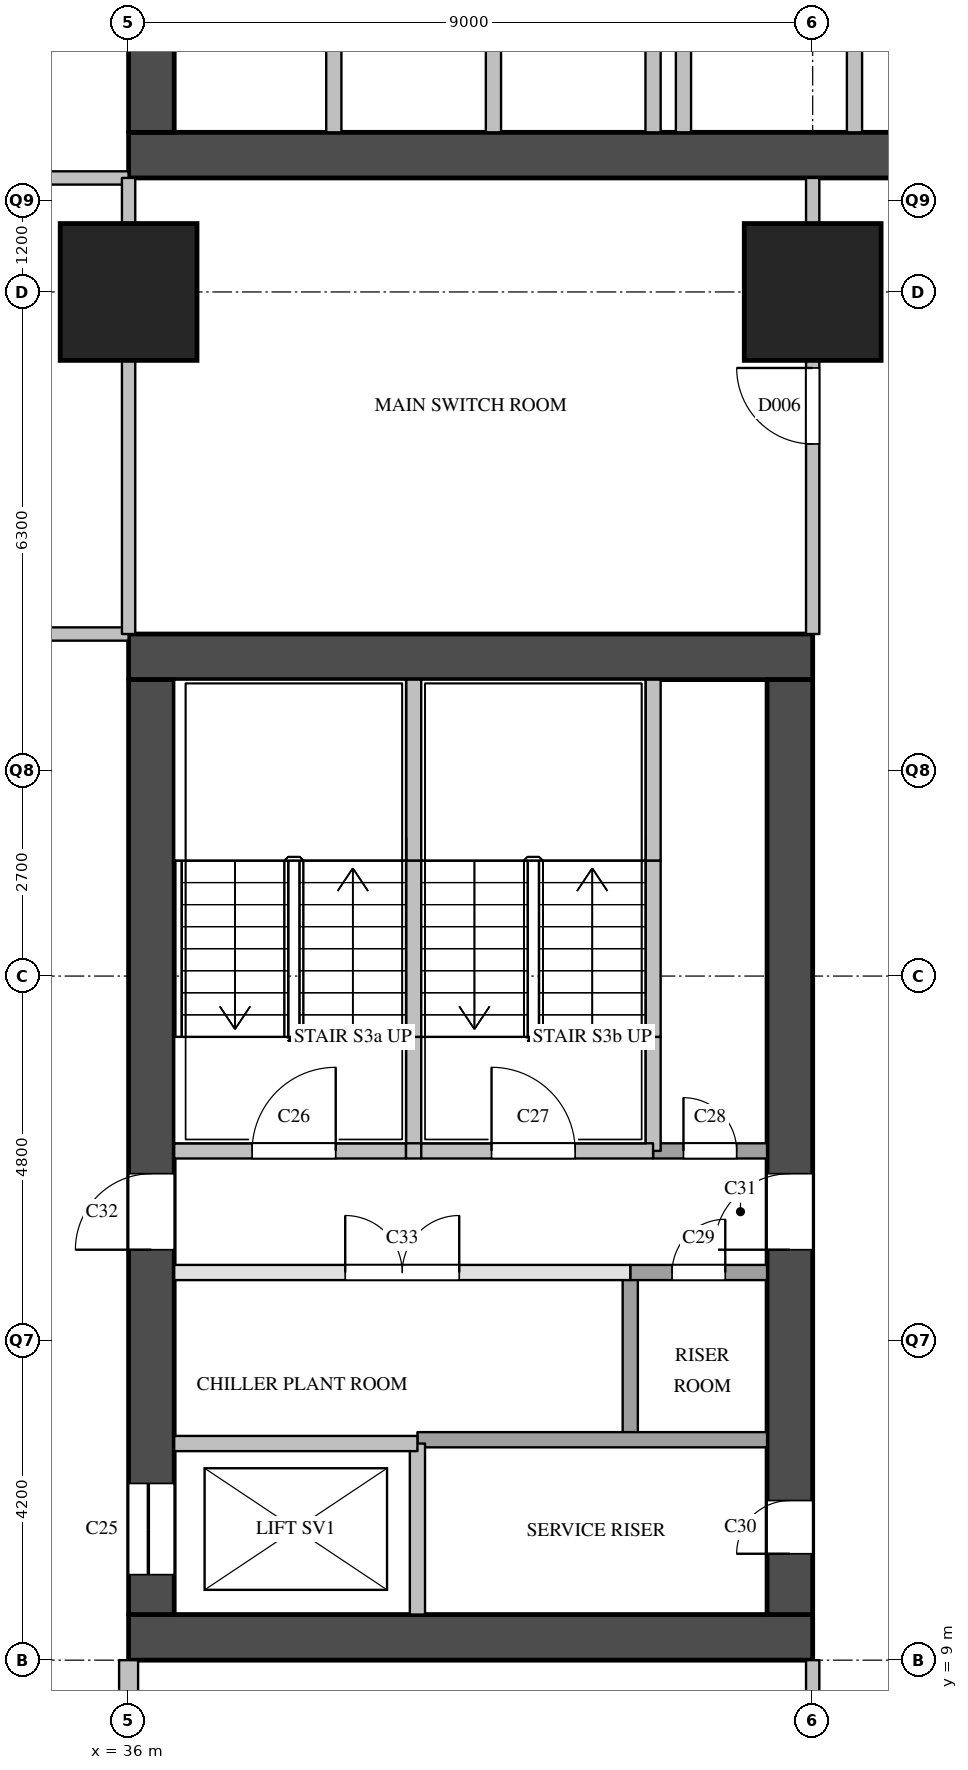
"""IFC4 building model, lengths in metres.
Left out: names, types, materials, properties, quantities, classifications, styles, units other than length and angle.
Written with IfcOpenShell. Run it as: python <this file> out.ifc"""

import sys

from ifc_helpers import new_model, si_unit, direction, frame, frame_2d, origin, origin_2d, place, context, subcontext, project, spatial, rectangle, extrude, element, fill, save


model = new_model("IFC4")
c1 = context("Model", 3, precision=1e-05, world=origin(), true_north=direction((0.0, 1.0)))
c2 = subcontext(c1, "Body", "Model", "MODEL_VIEW")
j1 = project(units=[si_unit("LENGTHUNIT", "METRE"), si_unit("PLANEANGLEUNIT", "RADIAN")], contexts=[c1])
p1 = place(None, origin())
s1 = spatial("IfcSite", under=j1, at=p1, CompositionType="ELEMENT")
p2 = place(p1, origin())
s2 = spatial("IfcBuilding", under=s1, at=p2, CompositionType="ELEMENT")
p3 = place(p2, frame((0.0, 0.0, -6.0)))
s3 = spatial("IfcBuildingStorey", under=s2, at=p3, CompositionType="ELEMENT", Elevation=-6.0)
for number, where, z_axis, x_axis in (
    (1, (36.0, 27.0, 0.0), (0.0, 0.0, 1.0), (1.0, 0.0, 0.0)),
    (2, (45.0, 27.0, 0.0), (0.0, 0.0, 1.0), (1.0, 0.0, 0.0)),
):
    element("IfcColumn", number, at=place(p3, frame(where, z_axis=z_axis, x_axis=x_axis)), inside=s3, PredefinedType="COLUMN", context=c2, shape_type="SweptSolid", body=[
        extrude(rectangle(XDim=1.8, YDim=1.8, at=origin_2d()), origin(), (0.0, 0.0, 1.0), 6.0),
    ])
p4 = place(p3, frame((36.0, 28.8, 0.0), z_axis=(0.0, 0.0, 1.0), x_axis=(1.0, 0.0, 0.0)))
e3 = element("IfcWall", 3, at=p4, inside=s3, PredefinedType="SHEAR", context=c2, shape_type="SweptSolid", body=[
    extrude(rectangle(XDim=12.4, YDim=0.6, at=frame_2d((6.2, 0.0))), origin(), (0.0, 0.0, 1.0), 5.59),
])
p5 = place(p3, frame((36.3, 29.1, 0.0), z_axis=(0.0, 0.0, 1.0), x_axis=(0.0, 1.0, 0.0)))
e4 = element("IfcWall", 4, at=p5, inside=s3, PredefinedType="SHEAR", context=c2, shape_type="SweptSolid", body=[
    extrude(rectangle(XDim=20.3, YDim=0.6, at=frame_2d((10.15, 0.0))), origin(), (0.0, 0.0, 1.0), 5.59),
])
p6 = place(p5, frame((16.4, 0.0, 0.0)))
e5 = element("IfcOpeningElement", 5, at=p6, cuts=e4, PredefinedType="OPENING", context=c2, shape_type="SweptSolid", body=[
    extrude(rectangle(XDim=1.0, YDim=2.1, at=frame_2d((0.5, 1.05))), frame((0.0, 0.31, 0.0), z_axis=(0.0, -1.0, 0.0), x_axis=(1.0, 0.0, 0.0)), (0.0, 0.0, 1.0), 0.62),
])
for number, where, z_axis, x_axis in (
    (6, (38.7, 29.1, 0.0), (0.0, 0.0, 1.0), (0.0, 1.0, 0.0)),
    (7, (40.8, 29.1, 0.0), (0.0, 0.0, 1.0), (0.0, 1.0, 0.0)),
    (8, (42.9, 29.1, 0.0), (0.0, 0.0, 1.0), (0.0, 1.0, 0.0)),
    (9, (43.3, 29.1, 0.0), (0.0, 0.0, 1.0), (0.0, 1.0, 0.0)),
    (10, (45.55, 29.1, 0.0), (0.0, 0.0, 1.0), (0.0, 1.0, 0.0)),
):
    element("IfcWall", number, at=place(p3, frame(where, z_axis=z_axis, x_axis=x_axis)), inside=s3, PredefinedType="SOLIDWALL", context=c2, shape_type="SweptSolid", body=[
        extrude(rectangle(XDim=3.2, YDim=0.2, at=frame_2d((1.6, 0.0))), origin(), (0.0, 0.0, 1.0), 5.59),
    ])
for number, where, z_axis, x_axis in (
    (11, (36.0, 9.3, 0.0), (0.0, 0.0, 1.0), (1.0, 0.0, 0.0)),
    (12, (36.0, 22.2, 0.0), (0.0, 0.0, 1.0), (1.0, 0.0, 0.0)),
):
    element("IfcWall", number, at=place(p3, frame(where, z_axis=z_axis, x_axis=x_axis)), inside=s3, PredefinedType="SHEAR", context=c2, shape_type="SweptSolid", body=[
        extrude(rectangle(XDim=9.0, YDim=0.6, at=frame_2d((4.5, 0.0))), origin(), (0.0, 0.0, 1.0), 5.59),
    ])
p7 = place(p3, frame((36.3, 9.6, 0.0), z_axis=(0.0, 0.0, 1.0), x_axis=(0.0, 1.0, 0.0)))
e13 = element("IfcWall", 13, at=p7, inside=s3, PredefinedType="SHEAR", context=c2, shape_type="SweptSolid", body=[
    extrude(rectangle(XDim=12.3, YDim=0.6, at=frame_2d((6.15, 0.0))), origin(), (0.0, 0.0, 1.0), 5.59),
])
p8 = place(p7, frame((0.525, 0.0, 0.0)))
e14 = element("IfcOpeningElement", 14, at=p8, cuts=e13, PredefinedType="OPENING", context=c2, shape_type="SweptSolid", body=[
    extrude(rectangle(XDim=1.2, YDim=2.1, at=frame_2d((0.6, 1.05))), frame((0.0, 0.31, 0.0), z_axis=(0.0, -1.0, 0.0), x_axis=(1.0, 0.0, 0.0)), (0.0, 0.0, 1.0), 0.62),
])
p9 = place(p7, frame((4.8, 0.0, 0.0)))
e15 = element("IfcOpeningElement", 15, at=p9, cuts=e13, PredefinedType="OPENING", context=c2, shape_type="SweptSolid", body=[
    extrude(rectangle(XDim=1.0, YDim=2.1, at=frame_2d((0.5, 1.05))), frame((0.0, 0.31, 0.0), z_axis=(0.0, -1.0, 0.0), x_axis=(1.0, 0.0, 0.0)), (0.0, 0.0, 1.0), 0.62),
])
p10 = place(p3, frame((44.7, 9.6, 0.0), z_axis=(0.0, 0.0, 1.0), x_axis=(0.0, 1.0, 0.0)))
e16 = element("IfcWall", 16, at=p10, inside=s3, PredefinedType="SHEAR", context=c2, shape_type="SweptSolid", body=[
    extrude(rectangle(XDim=12.3, YDim=0.6, at=frame_2d((6.15, 0.0))), origin(), (0.0, 0.0, 1.0), 5.59),
])
p11 = place(p10, frame((0.8, 0.0, 0.0)))
e17 = element("IfcOpeningElement", 17, at=p11, cuts=e16, PredefinedType="OPENING", context=c2, shape_type="SweptSolid", body=[
    extrude(rectangle(XDim=0.7, YDim=2.1, at=frame_2d((0.35, 1.05))), frame((0.0, 0.31, 0.0), z_axis=(0.0, -1.0, 0.0), x_axis=(1.0, 0.0, 0.0)), (0.0, 0.0, 1.0), 0.62),
])
p12 = place(p10, frame((4.8, 0.0, 0.0)))
e18 = element("IfcOpeningElement", 18, at=p12, cuts=e16, PredefinedType="OPENING", context=c2, shape_type="SweptSolid", body=[
    extrude(rectangle(XDim=1.0, YDim=2.1, at=frame_2d((0.5, 1.05))), frame((0.0, 0.31, 0.0), z_axis=(0.0, -1.0, 0.0), x_axis=(1.0, 0.0, 0.0)), (0.0, 0.0, 1.0), 0.62),
])
p13 = place(p3, frame((39.75, 15.7, 0.0), z_axis=(0.0, 0.0, 1.0), x_axis=(0.0, 1.0, 0.0)))
e19 = element("IfcWall", 19, at=p13, inside=s3, PredefinedType="SOLIDWALL", context=c2, shape_type="SweptSolid", body=[
    extrude(rectangle(XDim=1.5, YDim=0.2, at=frame_2d((0.75, 0.0))), origin(), (0.0, 0.0, 1.0), 5.59),
])
p14 = place(p3, frame((39.75, 17.2, 0.0), z_axis=(0.0, 0.0, 1.0), x_axis=(0.0, 1.0, 0.0)))
e20 = element("IfcWall", 20, at=p14, inside=s3, PredefinedType="SOLIDWALL", context=c2, shape_type="SweptSolid", body=[
    extrude(rectangle(XDim=2.32, YDim=0.2, at=frame_2d((1.16, 0.0))), origin(), (0.0, 0.0, 1.0), 5.59),
])
p15 = place(p3, frame((39.75, 19.52, 0.0), z_axis=(0.0, 0.0, 1.0), x_axis=(0.0, 1.0, 0.0)))
e21 = element("IfcWall", 21, at=p15, inside=s3, PredefinedType="SOLIDWALL", context=c2, shape_type="SweptSolid", body=[
    extrude(rectangle(XDim=2.38, YDim=0.2, at=frame_2d((1.19, 0.0))), origin(), (0.0, 0.0, 1.0), 5.59),
])
p16 = place(p3, frame((39.8, 9.6, 0.0), z_axis=(0.0, 0.0, 1.0), x_axis=(0.0, 1.0, 0.0)))
e22 = element("IfcWall", 22, at=p16, inside=s3, PredefinedType="SOLIDWALL", context=c2, shape_type="SweptSolid", body=[
    extrude(rectangle(XDim=2.25, YDim=0.2, at=frame_2d((1.125, 0.0))), origin(), (0.0, 0.0, 1.0), 5.59),
])
p17 = place(p3, frame((39.8, 11.85, 0.0), z_axis=(0.0, 0.0, 1.0), x_axis=(0.0, 1.0, 0.0)))
e23 = element("IfcWall", 23, at=p17, inside=s3, PredefinedType="SOLIDWALL", context=c2, shape_type="SweptSolid", body=[
    extrude(rectangle(XDim=0.05, YDim=0.2, at=frame_2d((0.025, 0.0))), origin(), (0.0, 0.0, 1.0), 5.59),
])
p18 = place(p3, frame((42.6, 11.9, 0.0), z_axis=(0.0, 0.0, 1.0), x_axis=(0.0, 1.0, 0.0)))
e24 = element("IfcWall", 24, at=p18, inside=s3, PredefinedType="SOLIDWALL", context=c2, shape_type="SweptSolid", body=[
    extrude(rectangle(XDim=2.2, YDim=0.2, at=frame_2d((1.1, 0.0))), origin(), (0.0, 0.0, 1.0), 5.59),
])
p19 = place(p3, frame((42.9, 15.7, 0.0), z_axis=(0.0, 0.0, 1.0), x_axis=(0.0, 1.0, 0.0)))
e25 = element("IfcWall", 25, at=p19, inside=s3, PredefinedType="SOLIDWALL", context=c2, shape_type="SweptSolid", body=[
    extrude(rectangle(XDim=1.5, YDim=0.2, at=frame_2d((0.75, 0.0))), origin(), (0.0, 0.0, 1.0), 5.59),
])
p20 = place(p3, frame((42.9, 17.2, 0.0), z_axis=(0.0, 0.0, 1.0), x_axis=(0.0, 1.0, 0.0)))
e26 = element("IfcWall", 26, at=p20, inside=s3, PredefinedType="SOLIDWALL", context=c2, shape_type="SweptSolid", body=[
    extrude(rectangle(XDim=2.32, YDim=0.2, at=frame_2d((1.16, 0.0))), origin(), (0.0, 0.0, 1.0), 5.59),
])
p21 = place(p3, frame((42.9, 19.52, 0.0), z_axis=(0.0, 0.0, 1.0), x_axis=(0.0, 1.0, 0.0)))
e27 = element("IfcWall", 27, at=p21, inside=s3, PredefinedType="SOLIDWALL", context=c2, shape_type="SweptSolid", body=[
    extrude(rectangle(XDim=2.38, YDim=0.2, at=frame_2d((1.19, 0.0))), origin(), (0.0, 0.0, 1.0), 5.59),
])
p22 = place(p3, frame((36.6, 11.85, 0.0), z_axis=(0.0, 0.0, 1.0), x_axis=(1.0, 0.0, 0.0)))
e28 = element("IfcWall", 28, at=p22, inside=s3, PredefinedType="SOLIDWALL", context=c2, shape_type="SweptSolid", body=[
    extrude(rectangle(XDim=3.2, YDim=0.2, at=frame_2d((1.6, 0.0))), origin(), (0.0, 0.0, 1.0), 5.59),
])
p23 = place(p3, frame((39.8, 11.9, 0.0), z_axis=(0.0, 0.0, 1.0), x_axis=(1.0, 0.0, 0.0)))
e29 = element("IfcWall", 29, at=p23, inside=s3, PredefinedType="SOLIDWALL", context=c2, shape_type="SweptSolid", body=[
    extrude(rectangle(XDim=4.6, YDim=0.2, at=frame_2d((2.3, 0.0))), origin(), (0.0, 0.0, 1.0), 5.59),
])
p24 = place(p3, frame((36.6, 14.1, 0.0), z_axis=(0.0, 0.0, 1.0), x_axis=(1.0, 0.0, 0.0)))
e30 = element("IfcWall", 30, at=p24, inside=s3, PredefinedType="PARTITIONING", context=c2, shape_type="SweptSolid", body=[
    extrude(rectangle(XDim=6.0, YDim=0.2, at=frame_2d((3.0, 0.0))), origin(), (0.0, 0.0, 1.0), 5.59),
])
p25 = place(p24, frame((2.25, 0.0, 0.0)))
e31 = element("IfcOpeningElement", 31, at=p25, cuts=e30, PredefinedType="OPENING", context=c2, shape_type="SweptSolid", body=[
    extrude(rectangle(XDim=1.5, YDim=2.1, at=frame_2d((0.75, 1.05))), frame((0.0, 0.11, 0.0), z_axis=(0.0, -1.0, 0.0), x_axis=(1.0, 0.0, 0.0)), (0.0, 0.0, 1.0), 0.22),
])
p26 = place(p3, frame((42.6, 14.1, 0.0), z_axis=(0.0, 0.0, 1.0), x_axis=(1.0, 0.0, 0.0)))
e32 = element("IfcWall", 32, at=p26, inside=s3, PredefinedType="SOLIDWALL", context=c2, shape_type="SweptSolid", body=[
    extrude(rectangle(XDim=1.8, YDim=0.2, at=frame_2d((0.9, 0.0))), origin(), (0.0, 0.0, 1.0), 5.59),
])
p27 = place(p26, frame((0.55, 0.0, 0.0)))
e33 = element("IfcOpeningElement", 33, at=p27, cuts=e32, PredefinedType="OPENING", context=c2, shape_type="SweptSolid", body=[
    extrude(rectangle(XDim=0.7, YDim=2.1, at=frame_2d((0.35, 1.05))), frame((0.0, 0.11, 0.0), z_axis=(0.0, -1.0, 0.0), x_axis=(1.0, 0.0, 0.0)), (0.0, 0.0, 1.0), 0.22),
])
p28 = place(p3, frame((42.9, 15.7, 0.0), z_axis=(0.0, 0.0, 1.0), x_axis=(1.0, 0.0, 0.0)))
e34 = element("IfcWall", 34, at=p28, inside=s3, PredefinedType="SOLIDWALL", context=c2, shape_type="SweptSolid", body=[
    extrude(rectangle(XDim=1.5, YDim=0.2, at=frame_2d((0.75, 0.0))), origin(), (0.0, 0.0, 1.0), 5.59),
])
p29 = place(p28, frame((0.4, 0.0, 0.0)))
e35 = element("IfcOpeningElement", 35, at=p29, cuts=e34, PredefinedType="OPENING", context=c2, shape_type="SweptSolid", body=[
    extrude(rectangle(XDim=0.7, YDim=2.1, at=frame_2d((0.35, 1.05))), frame((0.0, 0.11, 0.0), z_axis=(0.0, -1.0, 0.0), x_axis=(1.0, 0.0, 0.0)), (0.0, 0.0, 1.0), 0.22),
])
p30 = place(p3, frame((36.6, 15.7, 0.0), z_axis=(0.0, 0.0, 1.0), x_axis=(1.0, 0.0, 0.0)))
e36 = element("IfcWall", 36, at=p30, inside=s3, PredefinedType="SOLIDWALL", context=c2, shape_type="SweptSolid", body=[
    extrude(rectangle(XDim=3.05, YDim=0.2, at=frame_2d((1.525, 0.0))), origin(), (0.0, 0.0, 1.0), 5.59),
])
p31 = place(p30, frame((1.025, 0.0, 0.0)))
e37 = element("IfcOpeningElement", 37, at=p31, cuts=e36, PredefinedType="OPENING", context=c2, shape_type="SweptSolid", body=[
    extrude(rectangle(XDim=1.1, YDim=2.1, at=frame_2d((0.55, 1.05))), frame((0.0, 0.11, 0.0), z_axis=(0.0, -1.0, 0.0), x_axis=(1.0, 0.0, 0.0)), (0.0, 0.0, 1.0), 0.22),
])
p32 = place(p3, frame((39.65, 15.7, 0.0), z_axis=(0.0, 0.0, 1.0), x_axis=(1.0, 0.0, 0.0)))
e38 = element("IfcWall", 38, at=p32, inside=s3, PredefinedType="SOLIDWALL", context=c2, shape_type="SweptSolid", body=[
    extrude(rectangle(XDim=0.2, YDim=0.2, at=frame_2d((0.1, 0.0))), origin(), (0.0, 0.0, 1.0), 5.59),
])
p33 = place(p3, frame((39.85, 15.7, 0.0), z_axis=(0.0, 0.0, 1.0), x_axis=(1.0, 0.0, 0.0)))
e39 = element("IfcWall", 39, at=p33, inside=s3, PredefinedType="SOLIDWALL", context=c2, shape_type="SweptSolid", body=[
    extrude(rectangle(XDim=3.05, YDim=0.2, at=frame_2d((1.525, 0.0))), origin(), (0.0, 0.0, 1.0), 5.59),
])
p34 = place(p33, frame((0.925, 0.0, 0.0)))
e40 = element("IfcOpeningElement", 40, at=p34, cuts=e39, PredefinedType="OPENING", context=c2, shape_type="SweptSolid", body=[
    extrude(rectangle(XDim=1.1, YDim=2.1, at=frame_2d((0.55, 1.05))), frame((0.0, 0.11, 0.0), z_axis=(0.0, -1.0, 0.0), x_axis=(1.0, 0.0, 0.0)), (0.0, 0.0, 1.0), 0.22),
])
for number, where, z_axis, x_axis in (
    (41, (21.0, 22.5, 0.0), (0.0, 0.0, 1.0), (1.0, 0.0, 0.0)),
    (42, (21.0, 28.5, 0.0), (0.0, 0.0, 1.0), (1.0, 0.0, 0.0)),
):
    element("IfcWall", number, at=place(p3, frame(where, z_axis=z_axis, x_axis=x_axis)), inside=s3, PredefinedType="PARTITIONING", context=c2, shape_type="SweptSolid", body=[
        extrude(rectangle(XDim=15.0, YDim=0.175, at=frame_2d((7.5, 0.0))), origin(), (0.0, 0.0, 1.0), 5.59),
    ])
p35 = place(p3, frame((36.0, 22.5, 0.0), z_axis=(0.0, 0.0, 1.0), x_axis=(0.0, 1.0, 0.0)))
e43 = element("IfcWall", 43, at=p35, inside=s3, PredefinedType="PARTITIONING", context=c2, shape_type="SweptSolid", body=[
    extrude(rectangle(XDim=6.0, YDim=0.175, at=frame_2d((3.0, 0.0))), origin(), (0.0, 0.0, 1.0), 5.59),
])
p36 = place(p3, frame((45.0, 0.0, 0.0), z_axis=(0.0, 0.0, 1.0), x_axis=(0.0, 1.0, 0.0)))
e44 = element("IfcWall", 44, at=p36, inside=s3, PredefinedType="PARTITIONING", context=c2, shape_type="SweptSolid", body=[
    extrude(rectangle(XDim=9.0, YDim=0.175, at=frame_2d((4.5, 0.0))), origin(), (0.0, 0.0, 1.0), 5.59),
])
p37 = place(p36, frame((4.0, 0.0, 0.0)))
e45 = element("IfcOpeningElement", 45, at=p37, cuts=e44, PredefinedType="OPENING", context=c2, shape_type="SweptSolid", body=[
    extrude(rectangle(XDim=1.0, YDim=2.1, at=frame_2d((0.5, 1.05))), frame((0.0, 0.097, 0.0), z_axis=(0.0, -1.0, 0.0), x_axis=(1.0, 0.0, 0.0)), (0.0, 0.0, 1.0), 0.195),
])
p38 = place(p3, frame((45.0, 22.5, 0.0), z_axis=(0.0, 0.0, 1.0), x_axis=(0.0, 1.0, 0.0)))
e46 = element("IfcWall", 46, at=p38, inside=s3, PredefinedType="PARTITIONING", context=c2, shape_type="SweptSolid", body=[
    extrude(rectangle(XDim=6.0, YDim=0.175, at=frame_2d((3.0, 0.0))), origin(), (0.0, 0.0, 1.0), 5.59),
])
p39 = place(p38, frame((2.5, 0.0, 0.0)))
e47 = element("IfcOpeningElement", 47, at=p39, cuts=e46, PredefinedType="OPENING", context=c2, shape_type="SweptSolid", body=[
    extrude(rectangle(XDim=1.0, YDim=2.1, at=frame_2d((0.5, 1.05))), frame((0.0, 0.097, 0.0), z_axis=(0.0, -1.0, 0.0), x_axis=(1.0, 0.0, 0.0)), (0.0, 0.0, 1.0), 0.195),
])
p40 = place(p3, frame((36.0, 0.0, 0.0), z_axis=(0.0, 0.0, 1.0), x_axis=(0.0, 1.0, 0.0)))
e48 = element("IfcWall", 48, at=p40, inside=s3, PredefinedType="PARTITIONING", context=c2, shape_type="SweptSolid", body=[
    extrude(rectangle(XDim=9.0, YDim=0.25, at=frame_2d((4.5, 0.0))), origin(), (0.0, 0.0, 1.0), 5.59),
])
p41 = place(p8, origin())
e49 = element("IfcDoor", 49, at=p41, inside=s3, OperationType="SLIDING_TO_LEFT", PredefinedType="DOOR", context=c2, shape_type="SweptSolid", body=[
    extrude(rectangle(XDim=1.2, YDim=2.1, at=frame_2d((0.6, 1.05))), frame((0.0, 0.025, 0.0), z_axis=(0.0, -1.0, 0.0), x_axis=(1.0, 0.0, 0.0)), (0.0, 0.0, 1.0), 0.05),
])
fill(e14, e49)
p42 = place(p31, origin())
e50 = element("IfcDoor", 50, at=p42, inside=s3, OperationType="SINGLE_SWING_RIGHT", PredefinedType="DOOR", context=c2, shape_type="SweptSolid", body=[
    extrude(rectangle(XDim=1.1, YDim=2.1, at=frame_2d((0.55, 1.05))), frame((0.0, 0.025, 0.0), z_axis=(0.0, -1.0, 0.0), x_axis=(1.0, 0.0, 0.0)), (0.0, 0.0, 1.0), 0.05),
])
fill(e37, e50)
p43 = place(p34, origin())
e51 = element("IfcDoor", 51, at=p43, inside=s3, OperationType="SINGLE_SWING_LEFT", PredefinedType="DOOR", context=c2, shape_type="SweptSolid", body=[
    extrude(rectangle(XDim=1.1, YDim=2.1, at=frame_2d((0.55, 1.05))), frame((0.0, 0.025, 0.0), z_axis=(0.0, -1.0, 0.0), x_axis=(1.0, 0.0, 0.0)), (0.0, 0.0, 1.0), 0.05),
])
fill(e40, e51)
p44 = place(p29, origin())
e52 = element("IfcDoor", 52, at=p44, inside=s3, OperationType="SINGLE_SWING_LEFT", PredefinedType="DOOR", context=c2, shape_type="SweptSolid", body=[
    extrude(rectangle(XDim=0.7, YDim=2.1, at=frame_2d((0.35, 1.05))), frame((0.0, 0.025, 0.0), z_axis=(0.0, -1.0, 0.0), x_axis=(1.0, 0.0, 0.0)), (0.0, 0.0, 1.0), 0.05),
])
fill(e35, e52)
p45 = place(p27, origin())
e53 = element("IfcDoor", 53, at=p45, inside=s3, OperationType="SINGLE_SWING_RIGHT", PredefinedType="DOOR", context=c2, shape_type="SweptSolid", body=[
    extrude(rectangle(XDim=0.7, YDim=2.1, at=frame_2d((0.35, 1.05))), frame((0.0, 0.025, 0.0), z_axis=(0.0, -1.0, 0.0), x_axis=(1.0, 0.0, 0.0)), (0.0, 0.0, 1.0), 0.05),
])
fill(e33, e53)
p46 = place(p11, origin())
e54 = element("IfcDoor", 54, at=p46, inside=s3, OperationType="SINGLE_SWING_LEFT", PredefinedType="DOOR", context=c2, shape_type="SweptSolid", body=[
    extrude(rectangle(XDim=0.7, YDim=2.1, at=frame_2d((0.35, 1.05))), frame((0.0, 0.025, 0.0), z_axis=(0.0, -1.0, 0.0), x_axis=(1.0, 0.0, 0.0)), (0.0, 0.0, 1.0), 0.05),
])
fill(e17, e54)
p47 = place(p12, origin())
e55 = element("IfcDoor", 55, at=p47, inside=s3, OperationType="SINGLE_SWING_LEFT", PredefinedType="DOOR", context=c2, shape_type="SweptSolid", body=[
    extrude(rectangle(XDim=1.0, YDim=2.1, at=frame_2d((0.5, 1.05))), frame((0.0, 0.025, 0.0), z_axis=(0.0, -1.0, 0.0), x_axis=(1.0, 0.0, 0.0)), (0.0, 0.0, 1.0), 0.05),
])
fill(e18, e55)
p48 = place(p9, origin())
e56 = element("IfcDoor", 56, at=p48, inside=s3, OperationType="SINGLE_SWING_LEFT", PredefinedType="DOOR", context=c2, shape_type="SweptSolid", body=[
    extrude(rectangle(XDim=1.0, YDim=2.1, at=frame_2d((0.5, 1.05))), frame((0.0, 0.025, 0.0), z_axis=(0.0, -1.0, 0.0), x_axis=(1.0, 0.0, 0.0)), (0.0, 0.0, 1.0), 0.05),
])
fill(e15, e56)
p49 = place(p25, origin())
e57 = element("IfcDoor", 57, at=p49, inside=s3, OperationType="DOUBLE_DOOR_SINGLE_SWING", PredefinedType="DOOR", context=c2, shape_type="SweptSolid", body=[
    extrude(rectangle(XDim=1.5, YDim=2.1, at=frame_2d((0.75, 1.05))), frame((0.0, 0.025, 0.0), z_axis=(0.0, -1.0, 0.0), x_axis=(1.0, 0.0, 0.0)), (0.0, 0.0, 1.0), 0.05),
])
fill(e31, e57)
p50 = place(p39, origin())
e58 = element("IfcDoor", 58, at=p50, inside=s3, OperationType="SINGLE_SWING_RIGHT", PredefinedType="DOOR", context=c2, shape_type="SweptSolid", body=[
    extrude(rectangle(XDim=1.0, YDim=2.1, at=frame_2d((0.5, 1.05))), frame((0.0, 0.025, 0.0), z_axis=(0.0, -1.0, 0.0), x_axis=(1.0, 0.0, 0.0)), (0.0, 0.0, 1.0), 0.05),
])
fill(e47, e58)
save(model, sys.argv[1])
